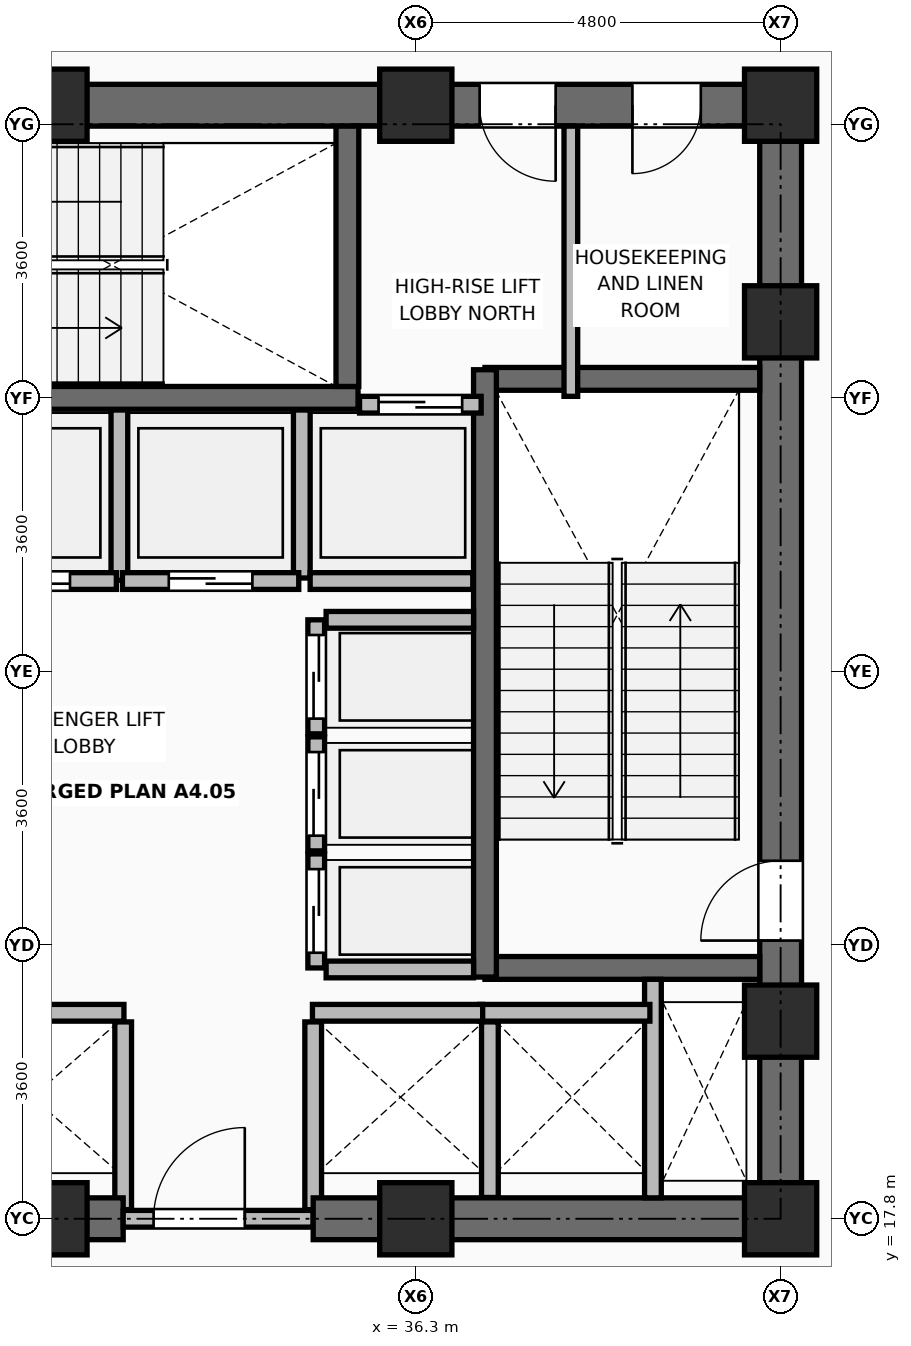
"""IFC4 building model, lengths in metres.
Left out: names, types, materials, properties, quantities, classifications, styles, units other than length and angle.
Written with IfcOpenShell. Run it as: python <this file> out.ifc"""

import sys

from ifc_helpers import new_model, si_unit, direction, frame, frame_2d, origin, origin_2d, place, context, subcontext, project, spatial, rectangle, extrude, element, fill, save


model = new_model("IFC4")
c1 = context("Model", 3, precision=1e-05, world=origin(), true_north=direction((0.0, 1.0)))
c2 = subcontext(c1, "Body", "Model", "MODEL_VIEW")
j1 = project(units=[si_unit("LENGTHUNIT", "METRE"), si_unit("PLANEANGLEUNIT", "RADIAN")], contexts=[c1])
p1 = place(None, origin())
s1 = spatial("IfcSite", under=j1, at=p1, CompositionType="ELEMENT")
p2 = place(p1, origin())
s2 = spatial("IfcBuilding", under=s1, at=p2, CompositionType="ELEMENT")
p3 = place(p2, frame((0.0, 0.0, 96.15)))
s3 = spatial("IfcBuildingStorey", under=s2, at=p3, CompositionType="ELEMENT", Elevation=96.15)
for number, where, z_axis, x_axis in (
    (1, (31.5, 17.8, 0.0), (0.0, 0.0, 1.0), (1.0, 0.0, 0.0)),
    (2, (36.3, 17.8, 0.0), (0.0, 0.0, 1.0), (1.0, 0.0, 0.0)),
    (3, (41.1, 17.8, 0.0), (0.0, 0.0, 1.0), (1.0, 0.0, 0.0)),
    (4, (41.1, 20.4, 0.0), (0.0, 0.0, 1.0), (1.0, 0.0, 0.0)),
    (5, (41.1, 29.6, 0.0), (0.0, 0.0, 1.0), (1.0, 0.0, 0.0)),
    (6, (31.5, 32.45, 0.0), (0.0, 0.0, 1.0), (1.0, 0.0, 0.0)),
    (7, (36.3, 32.45, 0.0), (0.0, 0.0, 1.0), (1.0, 0.0, 0.0)),
    (8, (41.1, 32.45, 0.0), (0.0, 0.0, 1.0), (1.0, 0.0, 0.0)),
):
    element("IfcColumn", number, at=place(p3, frame(where, z_axis=z_axis, x_axis=x_axis)), inside=s3, PredefinedType="COLUMN", context=c2, shape_type="SweptSolid", body=[
        extrude(rectangle(XDim=0.95, YDim=0.95, at=origin_2d()), origin(), (0.0, 0.0, 1.0), 4.8),
    ])
for number, where, z_axis, x_axis in (
    (9, (32.45, 17.92, 0.0), (0.0, 0.0, 1.0), (0.0, 1.0, 0.0)),
    (10, (34.95, 17.92, 0.0), (0.0, 0.0, 1.0), (0.0, 1.0, 0.0)),
):
    element("IfcWall", number, at=place(p3, frame(where, z_axis=z_axis, x_axis=x_axis)), inside=s3, PredefinedType="PARTITIONING", context=c2, shape_type="SweptSolid", body=[
        extrude(rectangle(XDim=2.47, YDim=0.22, at=frame_2d((1.235, 0.0))), origin(), (0.0, 0.0, 1.0), 4.056),
    ])
p4 = place(p3, frame((37.275, 18.08, 0.0), z_axis=(0.0, 0.0, 1.0), x_axis=(0.0, 1.0, 0.0)))
e11 = element("IfcWall", 11, at=p4, inside=s3, PredefinedType="PARTITIONING", context=c2, shape_type="SweptSolid", body=[
    extrude(rectangle(XDim=2.31, YDim=0.22, at=frame_2d((1.155, 0.0))), origin(), (0.0, 0.0, 1.0), 4.595),
])
p5 = place(p3, frame((32.4, 26.2, 0.0), z_axis=(0.0, 0.0, 1.0), x_axis=(0.0, 1.0, 0.0)))
e12 = element("IfcWall", 12, at=p5, inside=s3, PredefinedType="PARTITIONING", context=c2, shape_type="SweptSolid", body=[
    extrude(rectangle(XDim=2.24, YDim=0.22, at=frame_2d((1.12, 0.0))), origin(), (0.0, 0.0, 1.0), 4.595),
])
p6 = place(p3, frame((34.8, 26.23, 0.0), z_axis=(0.0, 0.0, 1.0), x_axis=(0.0, 1.0, 0.0)))
e13 = element("IfcWall", 13, at=p6, inside=s3, PredefinedType="PARTITIONING", context=c2, shape_type="SweptSolid", body=[
    extrude(rectangle(XDim=2.21, YDim=0.22, at=frame_2d((1.105, 0.0))), origin(), (0.0, 0.0, 1.0), 4.595),
])
p7 = place(p3, frame((34.91, 26.19, 0.0), z_axis=(0.0, 0.0, 1.0), x_axis=(1.0, 0.0, 0.0)))
e14 = element("IfcWall", 14, at=p7, inside=s3, PredefinedType="PARTITIONING", context=c2, shape_type="SweptSolid", body=[
    extrude(rectangle(XDim=2.14, YDim=0.22, at=frame_2d((1.07, 0.0))), origin(), (0.0, 0.0, 1.0), 4.595),
])
p8 = place(p3, frame((25.55, 17.8, 0.0), z_axis=(0.0, 0.0, 1.0), x_axis=(1.0, 0.0, 0.0)))
e15 = element("IfcWall", 15, at=p8, inside=s3, PredefinedType="SHEAR", context=c2, shape_type="SweptSolid", body=[
    extrude(rectangle(XDim=6.9, YDim=0.55, at=frame_2d((3.45, 0.0))), origin(), (0.0, 0.0, 1.0), 4.62),
])
p9 = place(p3, frame((32.45, 17.8, 0.0), z_axis=(0.0, 0.0, 1.0), x_axis=(1.0, 0.0, 0.0)))
e16 = element("IfcWall", 16, at=p9, inside=s3, PredefinedType="PARTITIONING", context=c2, shape_type="SweptSolid", body=[
    extrude(rectangle(XDim=2.5, YDim=0.22, at=frame_2d((1.25, 0.0))), origin(), (0.0, 0.0, 1.0), 4.056),
])
p10 = place(p9, frame((0.4, 0.0, 0.0)))
e17 = element("IfcOpeningElement", 17, at=p10, cuts=e16, PredefinedType="OPENING", context=c2, shape_type="SweptSolid", body=[
    extrude(rectangle(XDim=1.2, YDim=2.1, at=frame_2d((0.6, 1.05))), frame((0.0, 0.12, 0.0), z_axis=(0.0, -1.0, 0.0), x_axis=(1.0, 0.0, 0.0)), (0.0, 0.0, 1.0), 0.24),
])
p11 = place(p3, frame((34.95, 17.8, 0.0), z_axis=(0.0, 0.0, 1.0), x_axis=(1.0, 0.0, 0.0)))
e18 = element("IfcWall", 18, at=p11, inside=s3, PredefinedType="SHEAR", context=c2, shape_type="SweptSolid", body=[
    extrude(rectangle(XDim=6.425, YDim=0.55, at=frame_2d((3.212, 0.0))), origin(), (0.0, 0.0, 1.0), 4.62),
])
p12 = place(p3, frame((21.625, 32.45, 0.0), z_axis=(0.0, 0.0, 1.0), x_axis=(1.0, 0.0, 0.0)))
e19 = element("IfcWall", 19, at=p12, inside=s3, PredefinedType="SHEAR", context=c2, shape_type="SweptSolid", body=[
    extrude(rectangle(XDim=19.75, YDim=0.55, at=frame_2d((9.875, 0.0))), origin(), (0.0, 0.0, 1.0), 4.62),
])
p13 = place(p12, frame((2.125, 0.0, 0.0)))
e20 = element("IfcOpeningElement", 20, at=p13, cuts=e19, PredefinedType="OPENING", context=c2, shape_type="SweptSolid", body=[
    extrude(rectangle(XDim=1.1, YDim=2.1, at=frame_2d((0.55, 1.05))), frame((0.0, 0.285, 0.0), z_axis=(0.0, -1.0, 0.0), x_axis=(1.0, 0.0, 0.0)), (0.0, 0.0, 1.0), 0.57),
])
p14 = place(p12, frame((15.515, 0.0, 0.0)))
e21 = element("IfcOpeningElement", 21, at=p14, cuts=e19, PredefinedType="OPENING", context=c2, shape_type="SweptSolid", body=[
    extrude(rectangle(XDim=1.0, YDim=2.1, at=frame_2d((0.5, 1.05))), frame((0.0, 0.285, 0.0), z_axis=(0.0, -1.0, 0.0), x_axis=(1.0, 0.0, 0.0)), (0.0, 0.0, 1.0), 0.57),
])
p15 = place(p12, frame((17.525, 0.0, 0.0)))
e22 = element("IfcOpeningElement", 22, at=p15, cuts=e19, PredefinedType="OPENING", context=c2, shape_type="SweptSolid", body=[
    extrude(rectangle(XDim=0.9, YDim=2.1, at=frame_2d((0.45, 1.05))), frame((0.0, 0.285, 0.0), z_axis=(0.0, -1.0, 0.0), x_axis=(1.0, 0.0, 0.0)), (0.0, 0.0, 1.0), 0.57),
])
p16 = place(p3, frame((41.1, 18.075, 0.0), z_axis=(0.0, 0.0, 1.0), x_axis=(0.0, 1.0, 0.0)))
e23 = element("IfcWall", 23, at=p16, inside=s3, PredefinedType="SHEAR", context=c2, shape_type="SweptSolid", body=[
    extrude(rectangle(XDim=14.1, YDim=0.55, at=frame_2d((7.05, 0.0))), origin(), (0.0, 0.0, 1.0), 4.62),
])
p17 = place(p16, frame((3.385, 0.0, 0.0)))
e24 = element("IfcOpeningElement", 24, at=p17, cuts=e23, PredefinedType="OPENING", context=c2, shape_type="SweptSolid", body=[
    extrude(rectangle(XDim=1.05, YDim=2.1, at=frame_2d((0.525, 1.05))), frame((0.0, 0.285, 0.0), z_axis=(0.0, -1.0, 0.0), x_axis=(1.0, 0.0, 0.0)), (0.0, 0.0, 1.0), 0.57),
])
for number, where, z_axis, x_axis in (
    (25, (37.21, 21.1, 0.0), (0.0, 0.0, 1.0), (1.0, 0.0, 0.0)),
    (26, (37.21, 28.85, 0.0), (0.0, 0.0, 1.0), (1.0, 0.0, 0.0)),
):
    element("IfcWall", number, at=place(p3, frame(where, z_axis=z_axis, x_axis=x_axis)), inside=s3, PredefinedType="SHEAR", context=c2, shape_type="SweptSolid", body=[
        extrude(rectangle(XDim=3.615, YDim=0.3, at=frame_2d((1.808, 0.0))), origin(), (0.0, 0.0, 1.0), 4.62),
    ])
p18 = place(p3, frame((37.21, 20.98, 0.0), z_axis=(0.0, 0.0, 1.0), x_axis=(0.0, 1.0, 0.0)))
e27 = element("IfcWall", 27, at=p18, inside=s3, PredefinedType="SHEAR", context=c2, shape_type="SweptSolid", body=[
    extrude(rectangle(XDim=7.99, YDim=0.3, at=frame_2d((3.995, 0.0))), origin(), (0.0, 0.0, 1.0), 4.62),
])
p19 = place(p3, frame((27.51, 28.6, 0.0), z_axis=(0.0, 0.0, 1.0), x_axis=(1.0, 0.0, 0.0)))
e28 = element("IfcWall", 28, at=p19, inside=s3, PredefinedType="SHEAR", context=c2, shape_type="SweptSolid", body=[
    extrude(rectangle(XDim=8.03, YDim=0.3, at=frame_2d((4.015, 0.0))), origin(), (0.0, 0.0, 1.0), 4.62),
])
p20 = place(p3, frame((35.4, 28.75, 0.0), z_axis=(0.0, 0.0, 1.0), x_axis=(0.0, 1.0, 0.0)))
e29 = element("IfcWall", 29, at=p20, inside=s3, PredefinedType="SHEAR", context=c2, shape_type="SweptSolid", body=[
    extrude(rectangle(XDim=3.425, YDim=0.3, at=frame_2d((1.712, 0.0))), origin(), (0.0, 0.0, 1.0), 4.62),
])
p21 = place(p3, frame((39.42, 18.075, 0.0), z_axis=(0.0, 0.0, 1.0), x_axis=(0.0, 1.0, 0.0)))
e30 = element("IfcWall", 30, at=p21, inside=s3, PredefinedType="PARTITIONING", context=c2, shape_type="SweptSolid", body=[
    extrude(rectangle(XDim=2.875, YDim=0.22, at=frame_2d((1.438, 0.0))), origin(), (0.0, 0.0, 1.0), 4.6),
])
p22 = place(p3, frame((30.04, 20.51, 0.0), z_axis=(0.0, 0.0, 1.0), x_axis=(1.0, 0.0, 0.0)))
e31 = element("IfcWall", 31, at=p22, inside=s3, PredefinedType="PARTITIONING", context=c2, shape_type="SweptSolid", body=[
    extrude(rectangle(XDim=2.42, YDim=0.22, at=frame_2d((1.21, 0.0))), origin(), (0.0, 0.0, 1.0), 4.6),
])
for number, where, z_axis, x_axis in (
    (32, (37.14, 20.51, 0.0), (0.0, 0.0, 1.0), (1.0, 0.0, 0.0)),
    (33, (34.94, 20.51, 0.0), (0.0, 0.0, 1.0), (1.0, 0.0, 0.0)),
):
    element("IfcWall", number, at=place(p3, frame(where, z_axis=z_axis, x_axis=x_axis)), inside=s3, PredefinedType="PARTITIONING", context=c2, shape_type="SweptSolid", body=[
        extrude(rectangle(XDim=2.24, YDim=0.22, at=frame_2d((1.12, 0.0))), origin(), (0.0, 0.0, 1.0), 4.6),
    ])
p23 = place(p3, frame((30.04, 26.19, 0.0), z_axis=(0.0, 0.0, 1.0), x_axis=(1.0, 0.0, 0.0)))
e34 = element("IfcWall", 34, at=p23, inside=s3, PredefinedType="PARTITIONING", context=c2, shape_type="SweptSolid", body=[
    extrude(rectangle(XDim=2.32, YDim=0.22, at=frame_2d((1.16, 0.0))), origin(), (0.0, 0.0, 1.0), 4.6),
])
p24 = place(p23, frame((0.61, 0.0, 0.0)))
e35 = element("IfcOpeningElement", 35, at=p24, cuts=e34, PredefinedType="OPENING", context=c2, shape_type="SweptSolid", body=[
    extrude(rectangle(XDim=1.1, YDim=2.2, at=frame_2d((0.55, 1.1))), frame((0.0, 0.12, 0.0), z_axis=(0.0, -1.0, 0.0), x_axis=(1.0, 0.0, 0.0)), (0.0, 0.0, 1.0), 0.24),
])
p25 = place(p3, frame((32.44, 26.19, 0.0), z_axis=(0.0, 0.0, 1.0), x_axis=(1.0, 0.0, 0.0)))
e36 = element("IfcWall", 36, at=p25, inside=s3, PredefinedType="PARTITIONING", context=c2, shape_type="SweptSolid", body=[
    extrude(rectangle(XDim=2.32, YDim=0.22, at=frame_2d((1.16, 0.0))), origin(), (0.0, 0.0, 1.0), 4.6),
])
p26 = place(p25, frame((0.61, 0.0, 0.0)))
e37 = element("IfcOpeningElement", 37, at=p26, cuts=e36, PredefinedType="OPENING", context=c2, shape_type="SweptSolid", body=[
    extrude(rectangle(XDim=1.1, YDim=2.2, at=frame_2d((0.55, 1.1))), frame((0.0, 0.12, 0.0), z_axis=(0.0, -1.0, 0.0), x_axis=(1.0, 0.0, 0.0)), (0.0, 0.0, 1.0), 0.24),
])
p27 = place(p3, frame((35.56, 28.51, 0.0), z_axis=(0.0, 0.0, 1.0), x_axis=(1.0, 0.0, 0.0)))
e38 = element("IfcWall", 38, at=p27, inside=s3, PredefinedType="PARTITIONING", context=c2, shape_type="SweptSolid", body=[
    extrude(rectangle(XDim=1.6, YDim=0.22, at=frame_2d((0.8, 0.0))), origin(), (0.0, 0.0, 1.0), 4.6),
])
p28 = place(p27, frame((0.25, 0.0, 0.0)))
e39 = element("IfcOpeningElement", 39, at=p28, cuts=e38, PredefinedType="OPENING", context=c2, shape_type="SweptSolid", body=[
    extrude(rectangle(XDim=1.1, YDim=2.2, at=frame_2d((0.55, 1.1))), frame((0.0, 0.12, 0.0), z_axis=(0.0, -1.0, 0.0), x_axis=(1.0, 0.0, 0.0)), (0.0, 0.0, 1.0), 0.24),
])
p29 = place(p3, frame((34.99, 21.1, 0.0), z_axis=(0.0, 0.0, 1.0), x_axis=(0.0, 1.0, 0.0)))
e40 = element("IfcWall", 40, at=p29, inside=s3, PredefinedType="PARTITIONING", context=c2, shape_type="SweptSolid", body=[
    extrude(rectangle(XDim=1.5, YDim=0.22, at=frame_2d((0.75, 0.0))), origin(), (0.0, 0.0, 1.0), 4.6),
])
p30 = place(p29, frame((0.2, 0.0, 0.0)))
e41 = element("IfcOpeningElement", 41, at=p30, cuts=e40, PredefinedType="OPENING", context=c2, shape_type="SweptSolid", body=[
    extrude(rectangle(XDim=1.1, YDim=2.2, at=frame_2d((0.55, 1.1))), frame((0.0, 0.12, 0.0), z_axis=(0.0, -1.0, 0.0), x_axis=(1.0, 0.0, 0.0)), (0.0, 0.0, 1.0), 0.24),
])
p31 = place(p3, frame((34.99, 22.64, 0.0), z_axis=(0.0, 0.0, 1.0), x_axis=(0.0, 1.0, 0.0)))
e42 = element("IfcWall", 42, at=p31, inside=s3, PredefinedType="PARTITIONING", context=c2, shape_type="SweptSolid", body=[
    extrude(rectangle(XDim=1.5, YDim=0.22, at=frame_2d((0.75, 0.0))), origin(), (0.0, 0.0, 1.0), 4.6),
])
p32 = place(p31, frame((0.2, 0.0, 0.0)))
e43 = element("IfcOpeningElement", 43, at=p32, cuts=e42, PredefinedType="OPENING", context=c2, shape_type="SweptSolid", body=[
    extrude(rectangle(XDim=1.1, YDim=2.2, at=frame_2d((0.55, 1.1))), frame((0.0, 0.12, 0.0), z_axis=(0.0, -1.0, 0.0), x_axis=(1.0, 0.0, 0.0)), (0.0, 0.0, 1.0), 0.24),
])
p33 = place(p3, frame((34.99, 24.18, 0.0), z_axis=(0.0, 0.0, 1.0), x_axis=(0.0, 1.0, 0.0)))
e44 = element("IfcWall", 44, at=p33, inside=s3, PredefinedType="PARTITIONING", context=c2, shape_type="SweptSolid", body=[
    extrude(rectangle(XDim=1.5, YDim=0.22, at=frame_2d((0.75, 0.0))), origin(), (0.0, 0.0, 1.0), 4.6),
])
p34 = place(p33, frame((0.2, 0.0, 0.0)))
e45 = element("IfcOpeningElement", 45, at=p34, cuts=e44, PredefinedType="OPENING", context=c2, shape_type="SweptSolid", body=[
    extrude(rectangle(XDim=1.1, YDim=2.2, at=frame_2d((0.55, 1.1))), frame((0.0, 0.12, 0.0), z_axis=(0.0, -1.0, 0.0), x_axis=(1.0, 0.0, 0.0)), (0.0, 0.0, 1.0), 0.24),
])
for number, where, z_axis, x_axis in (
    (46, (35.12, 21.08, 0.0), (0.0, 0.0, 1.0), (1.0, 0.0, 0.0)),
    (47, (35.12, 25.68, 0.0), (0.0, 0.0, 1.0), (1.0, 0.0, 0.0)),
):
    element("IfcWall", number, at=place(p3, frame(where, z_axis=z_axis, x_axis=x_axis)), inside=s3, PredefinedType="PARTITIONING", context=c2, shape_type="SweptSolid", body=[
        extrude(rectangle(XDim=1.94, YDim=0.22, at=frame_2d((0.97, 0.0))), origin(), (0.0, 0.0, 1.0), 4.6),
    ])
p35 = place(p3, frame((38.34, 28.62, 0.0), z_axis=(0.0, 0.0, 1.0), x_axis=(0.0, 1.0, 0.0)))
e48 = element("IfcWall", 48, at=p35, inside=s3, PredefinedType="PARTITIONING", context=c2, shape_type="SweptSolid", body=[
    extrude(rectangle(XDim=3.555, YDim=0.18, at=frame_2d((1.777, 0.0))), origin(), (0.0, 0.0, 1.0), 4.6),
])
p36 = place(p10, origin())
e49 = element("IfcDoor", 49, at=p36, inside=s3, OperationType="SINGLE_SWING_RIGHT", PredefinedType="DOOR", context=c2, shape_type="SweptSolid", body=[
    extrude(rectangle(XDim=1.2, YDim=2.1, at=frame_2d((0.6, 1.05))), frame((0.0, 0.025, 0.0), z_axis=(0.0, -1.0, 0.0), x_axis=(1.0, 0.0, 0.0)), (0.0, 0.0, 1.0), 0.05),
])
fill(e17, e49)
p37 = place(p17, origin())
e50 = element("IfcDoor", 50, at=p37, inside=s3, OperationType="SINGLE_SWING_LEFT", PredefinedType="DOOR", context=c2, shape_type="SweptSolid", body=[
    extrude(rectangle(XDim=1.05, YDim=2.1, at=frame_2d((0.525, 1.05))), frame((0.0, 0.025, 0.0), z_axis=(0.0, -1.0, 0.0), x_axis=(1.0, 0.0, 0.0)), (0.0, 0.0, 1.0), 0.05),
])
fill(e24, e50)
p38 = place(p24, frame((1.1, 0.0, 0.0), z_axis=(0.0, 0.0, 1.0), x_axis=(-1.0, 0.0, 0.0)))
e51 = element("IfcDoor", 51, at=p38, inside=s3, OperationType="DOUBLE_DOOR_SLIDING", PredefinedType="DOOR", context=c2, shape_type="SweptSolid", body=[
    extrude(rectangle(XDim=1.1, YDim=2.2, at=frame_2d((0.55, 1.1))), frame((0.0, 0.025, 0.0), z_axis=(0.0, -1.0, 0.0), x_axis=(1.0, 0.0, 0.0)), (0.0, 0.0, 1.0), 0.05),
])
fill(e35, e51)
p39 = place(p26, frame((1.1, 0.0, 0.0), z_axis=(0.0, 0.0, 1.0), x_axis=(-1.0, 0.0, 0.0)))
e52 = element("IfcDoor", 52, at=p39, inside=s3, OperationType="DOUBLE_DOOR_SLIDING", PredefinedType="DOOR", context=c2, shape_type="SweptSolid", body=[
    extrude(rectangle(XDim=1.1, YDim=2.2, at=frame_2d((0.55, 1.1))), frame((0.0, 0.025, 0.0), z_axis=(0.0, -1.0, 0.0), x_axis=(1.0, 0.0, 0.0)), (0.0, 0.0, 1.0), 0.05),
])
fill(e37, e52)
p40 = place(p28, origin())
e53 = element("IfcDoor", 53, at=p40, inside=s3, OperationType="DOUBLE_DOOR_SLIDING", PredefinedType="DOOR", context=c2, shape_type="SweptSolid", body=[
    extrude(rectangle(XDim=1.1, YDim=2.2, at=frame_2d((0.55, 1.1))), frame((0.0, 0.025, 0.0), z_axis=(0.0, -1.0, 0.0), x_axis=(1.0, 0.0, 0.0)), (0.0, 0.0, 1.0), 0.05),
])
fill(e39, e53)
p41 = place(p30, origin())
e54 = element("IfcDoor", 54, at=p41, inside=s3, OperationType="DOUBLE_DOOR_SLIDING", PredefinedType="DOOR", context=c2, shape_type="SweptSolid", body=[
    extrude(rectangle(XDim=1.1, YDim=2.2, at=frame_2d((0.55, 1.1))), frame((0.0, 0.025, 0.0), z_axis=(0.0, -1.0, 0.0), x_axis=(1.0, 0.0, 0.0)), (0.0, 0.0, 1.0), 0.05),
])
fill(e41, e54)
p42 = place(p32, origin())
e55 = element("IfcDoor", 55, at=p42, inside=s3, OperationType="DOUBLE_DOOR_SLIDING", PredefinedType="DOOR", context=c2, shape_type="SweptSolid", body=[
    extrude(rectangle(XDim=1.1, YDim=2.2, at=frame_2d((0.55, 1.1))), frame((0.0, 0.025, 0.0), z_axis=(0.0, -1.0, 0.0), x_axis=(1.0, 0.0, 0.0)), (0.0, 0.0, 1.0), 0.05),
])
fill(e43, e55)
p43 = place(p34, origin())
e56 = element("IfcDoor", 56, at=p43, inside=s3, OperationType="DOUBLE_DOOR_SLIDING", PredefinedType="DOOR", context=c2, shape_type="SweptSolid", body=[
    extrude(rectangle(XDim=1.1, YDim=2.2, at=frame_2d((0.55, 1.1))), frame((0.0, 0.025, 0.0), z_axis=(0.0, -1.0, 0.0), x_axis=(1.0, 0.0, 0.0)), (0.0, 0.0, 1.0), 0.05),
])
fill(e45, e56)
p44 = place(p14, frame((1.0, 0.0, 0.0), z_axis=(0.0, 0.0, 1.0), x_axis=(-1.0, 0.0, 0.0)))
e57 = element("IfcDoor", 57, at=p44, inside=s3, OperationType="SINGLE_SWING_LEFT", PredefinedType="DOOR", context=c2, shape_type="SweptSolid", body=[
    extrude(rectangle(XDim=1.0, YDim=2.1, at=frame_2d((0.5, 1.05))), frame((0.0, 0.025, 0.0), z_axis=(0.0, -1.0, 0.0), x_axis=(1.0, 0.0, 0.0)), (0.0, 0.0, 1.0), 0.05),
])
fill(e21, e57)
p45 = place(p15, frame((0.9, 0.0, 0.0), z_axis=(0.0, 0.0, 1.0), x_axis=(-1.0, 0.0, 0.0)))
e58 = element("IfcDoor", 58, at=p45, inside=s3, OperationType="SINGLE_SWING_RIGHT", PredefinedType="DOOR", context=c2, shape_type="SweptSolid", body=[
    extrude(rectangle(XDim=0.9, YDim=2.1, at=frame_2d((0.45, 1.05))), frame((0.0, 0.025, 0.0), z_axis=(0.0, -1.0, 0.0), x_axis=(1.0, 0.0, 0.0)), (0.0, 0.0, 1.0), 0.05),
])
fill(e22, e58)
save(model, sys.argv[1])
